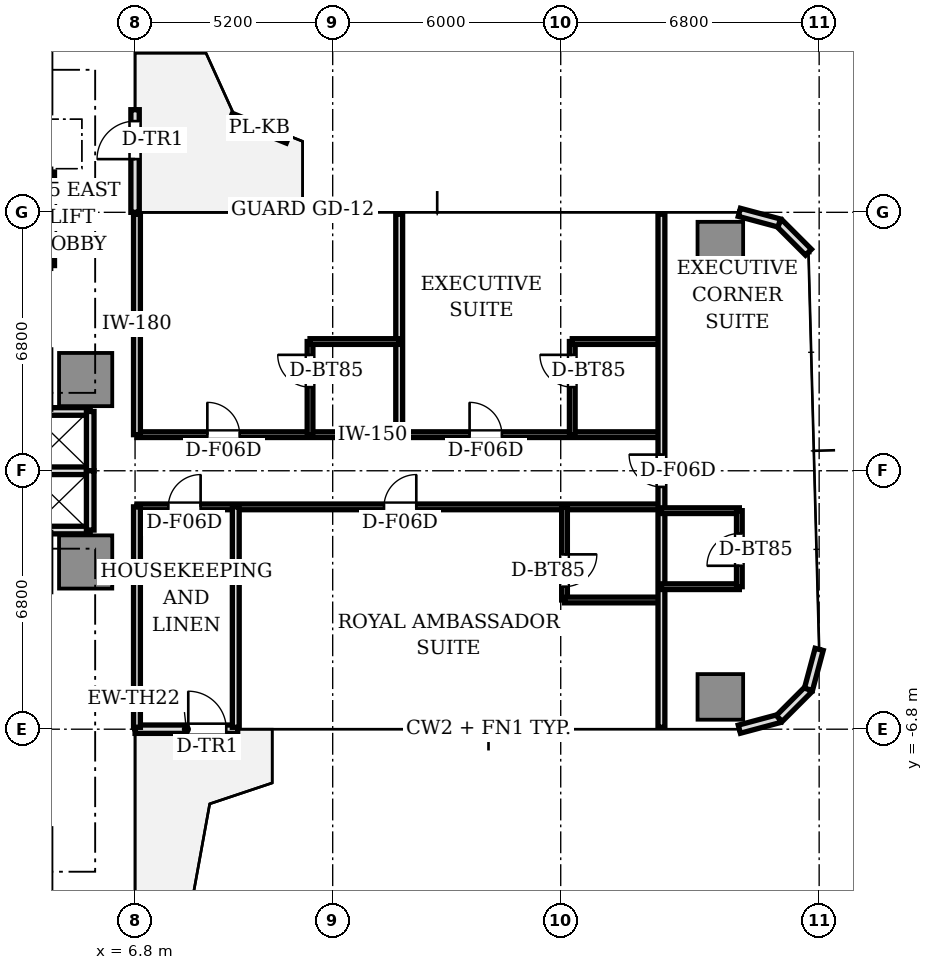
"""IFC4 building model, lengths in metres.
Left out: names, types, materials, properties, quantities, classifications, styles, units other than length and angle.
Written with IfcOpenShell. Run it as: python <this file> out.ifc"""

import sys

from ifc_helpers import new_model, si_unit, direction, frame, frame_2d, origin, origin_2d, place, context, subcontext, project, spatial, rectangle, extrude, source, transform, mapped, element, fill, save


model = new_model("IFC4")
c1 = context("Model", 3, precision=1e-05, world=origin(), true_north=direction((0.0, 1.0)))
c2 = subcontext(c1, "Body", "Model", "MODEL_VIEW")
j1 = project(units=[si_unit("LENGTHUNIT", "METRE"), si_unit("PLANEANGLEUNIT", "RADIAN")], contexts=[c1])
p1 = place(None, origin())
s1 = spatial("IfcSite", under=j1, at=p1, CompositionType="ELEMENT")
p2 = place(p1, origin())
s2 = spatial("IfcBuilding", under=s1, at=p2, CompositionType="ELEMENT")
p3 = place(p2, frame((0.0, 0.0, 57.75)))
s3 = spatial("IfcBuildingStorey", under=s2, at=p3, CompositionType="ELEMENT", Elevation=57.75)
m1 = source(origin(), c2, "Body", "SweptSolid", [
    extrude(rectangle(XDim=1.4, YDim=1.4, at=origin_2d()), origin(), (0.0, 0.0, 1.0), 3.11),
])
for number, where, z_axis, x_axis in (
    (1, (5.5, 2.4, 0.0), (0.0, 0.0, 1.0), (1.0, 0.0, 0.0)),
    (2, (5.5, -2.4, 0.0), (0.0, 0.0, 1.0), (1.0, 0.0, 0.0)),
):
    element("IfcColumn", number, at=place(p3, frame(where, z_axis=z_axis, x_axis=x_axis)), inside=s3, PredefinedType="COLUMN", context=c2, shape_type="MappedRepresentation", body=[
        mapped(m1, transform((0.0, 0.0, 0.0), scale=1.0)),
    ])
m2 = source(origin(), c2, "Body", "SweptSolid", [
    extrude(rectangle(XDim=1.2, YDim=1.2, at=origin_2d()), origin(), (0.0, 0.0, 1.0), 3.11),
])
for number, where, z_axis, x_axis in (
    (3, (22.2, -5.95, 0.0), (0.0, 0.0, 1.0), (1.0, 0.0, 0.0)),
    (4, (22.2, 5.95, 0.0), (0.0, 0.0, 1.0), (1.0, 0.0, 0.0)),
):
    element("IfcColumn", number, at=place(p3, frame(where, z_axis=z_axis, x_axis=x_axis)), inside=s3, PredefinedType="COLUMN", context=c2, shape_type="MappedRepresentation", body=[
        mapped(m2, transform((0.0, 0.0, 0.0), scale=1.0)),
    ])
p4 = place(p3, frame((6.8, -6.8, 0.0), z_axis=(0.0, 0.0, 1.0), x_axis=(1.0, 0.0, 0.0)))
e5 = element("IfcWall", 5, at=p4, inside=s3, PredefinedType="STANDARD", context=c2, shape_type="SweptSolid", body=[
    extrude(rectangle(XDim=2.7, YDim=0.22, at=frame_2d((1.35, 0.0))), origin(), (0.0, 0.0, 1.0), 3.11),
])
p5 = place(p4, frame((1.4, 0.0, 0.0)))
e6 = element("IfcOpeningElement", 6, at=p5, cuts=e5, PredefinedType="OPENING", context=c2, shape_type="SweptSolid", body=[
    extrude(rectangle(XDim=1.0, YDim=2.2, at=frame_2d((0.5, 1.1))), frame((0.0, 0.12, 0.0), z_axis=(0.0, -1.0, 0.0), x_axis=(1.0, 0.0, 0.0)), (0.0, 0.0, 1.0), 0.24),
])
for number, where, z_axis, x_axis in (
    (7, (22.7, -6.8, 0.0), (0.0, 0.0, 1.0), (0.966, 0.259, 0.0)),
    (8, (23.75, -6.519, 0.0), (0.0, 0.0, 1.0), (0.707, 0.707, 0.0)),
    (9, (24.519, -5.75, 0.0), (0.0, 0.0, 1.0), (0.259, 0.966, 0.0)),
    (10, (24.519, 5.75, 0.0), (0.0, 0.0, 1.0), (-0.707, 0.707, 0.0)),
    (11, (23.75, 6.519, 0.0), (0.0, 0.0, 1.0), (-0.966, 0.259, 0.0)),
):
    element("IfcWall", number, at=place(p3, frame(where, z_axis=z_axis, x_axis=x_axis)), inside=s3, PredefinedType="STANDARD", context=c2, shape_type="SweptSolid", body=[
        extrude(rectangle(XDim=1.087, YDim=0.22, at=frame_2d((0.543, 0.0))), origin(), (0.0, 0.0, 1.0), 3.11),
    ])
p6 = place(p3, frame((6.8, 6.8, 0.0), z_axis=(0.0, 0.0, 1.0), x_axis=(0.0, 1.0, 0.0)))
e12 = element("IfcWall", 12, at=p6, inside=s3, PredefinedType="STANDARD", context=c2, shape_type="SweptSolid", body=[
    extrude(rectangle(XDim=2.7, YDim=0.22, at=frame_2d((1.35, 0.0))), origin(), (0.0, 0.0, 1.0), 3.11),
])
p7 = place(p6, frame((1.4, 0.0, 0.0)))
e13 = element("IfcOpeningElement", 13, at=p7, cuts=e12, PredefinedType="OPENING", context=c2, shape_type="SweptSolid", body=[
    extrude(rectangle(XDim=1.0, YDim=2.2, at=frame_2d((0.5, 1.1))), frame((0.0, 0.12, 0.0), z_axis=(0.0, -1.0, 0.0), x_axis=(1.0, 0.0, 0.0)), (0.0, 0.0, 1.0), 0.24),
])
p8 = place(p3, frame((10.815, 8.716, 0.0), z_axis=(0.0, 0.0, 1.0), x_axis=(-0.928592072744, 0.371102091664, 0.0)))
e14 = element("IfcWall", 14, at=p8, inside=s3, PredefinedType="PARAPET", context=c2, shape_type="SweptSolid", body=[
    extrude(rectangle(XDim=1.604, YDim=0.2, at=frame_2d((0.802, 0.0))), origin(), (0.0, 0.0, 1.0), 0.65),
])
for number, where, z_axis, x_axis in (
    (15, (3.98, 1.56, 0.0), (0.0, 0.0, 1.0), (1.0, 0.0, 0.0)),
    (16, (3.98, -1.56, 0.0), (0.0, 0.0, 1.0), (1.0, 0.0, 0.0)),
    (17, (3.98, 0.0, 0.0), (0.0, 0.0, 1.0), (1.0, 0.0, 0.0)),
):
    element("IfcWall", number, at=place(p3, frame(where, z_axis=z_axis, x_axis=x_axis)), inside=s3, PredefinedType="SOLIDWALL", context=c2, shape_type="SweptSolid", body=[
        extrude(rectangle(XDim=1.64, YDim=0.2, at=frame_2d((0.82, 0.0))), origin(), (0.0, 0.0, 1.0), 2.66),
    ])
for number, where, z_axis, x_axis in (
    (18, (5.62, 0.0, 0.0), (0.0, 0.0, 1.0), (0.0, 1.0, 0.0)),
    (19, (5.62, -1.56, 0.0), (0.0, 0.0, 1.0), (0.0, 1.0, 0.0)),
):
    element("IfcWall", number, at=place(p3, frame(where, z_axis=z_axis, x_axis=x_axis)), inside=s3, PredefinedType="SOLIDWALL", context=c2, shape_type="SweptSolid", body=[
        extrude(rectangle(XDim=1.56, YDim=0.2, at=frame_2d((0.78, 0.0))), origin(), (0.0, 0.0, 1.0), 2.66),
    ])
p9 = place(p3, frame((4.58, 5.4, 0.0), z_axis=(0.0, 0.0, 1.0), x_axis=(0.0, 1.0, 0.0)))
e20 = element("IfcWall", 20, at=p9, inside=s3, PredefinedType="SOLIDWALL", context=c2, shape_type="SweptSolid", body=[
    extrude(rectangle(XDim=2.46, YDim=0.2, at=frame_2d((1.23, 0.0))), origin(), (0.0, 0.0, 1.0), 2.66),
])
p10 = place(p9, frame((0.2, 0.0, 0.0)))
e21 = element("IfcOpeningElement", 21, at=p10, cuts=e20, PredefinedType="OPENING", context=c2, shape_type="SweptSolid", body=[
    extrude(rectangle(XDim=0.85, YDim=2.1, at=frame_2d((0.425, 1.05))), frame((0.0, 0.11, 0.0), z_axis=(0.0, -1.0, 0.0), x_axis=(1.0, 0.0, 0.0)), (0.0, 0.0, 1.0), 0.22),
])
p11 = place(p9, frame((1.38, 0.0, 0.0)))
e22 = element("IfcOpeningElement", 22, at=p11, cuts=e20, PredefinedType="OPENING", context=c2, shape_type="SweptSolid", body=[
    extrude(rectangle(XDim=0.85, YDim=2.1, at=frame_2d((0.425, 1.05))), frame((0.0, 0.11, 0.0), z_axis=(0.0, -1.0, 0.0), x_axis=(1.0, 0.0, 0.0)), (0.0, 0.0, 1.0), 0.22),
])
p12 = place(p3, frame((6.85, 0.95, 0.0), z_axis=(0.0, 0.0, 1.0), x_axis=(1.0, 0.0, 0.0)))
e23 = element("IfcWall", 23, at=p12, inside=s3, PredefinedType="PARTITIONING", context=c2, shape_type="SweptSolid", body=[
    extrude(rectangle(XDim=13.8, YDim=0.15, at=frame_2d((6.9, 0.0))), origin(), (0.0, 0.0, 1.0), 2.66),
])
p13 = place(p12, frame((1.852, 0.0, 0.0)))
e24 = element("IfcOpeningElement", 24, at=p13, cuts=e23, PredefinedType="OPENING", context=c2, shape_type="SweptSolid", body=[
    extrude(rectangle(XDim=0.85, YDim=2.1, at=frame_2d((0.425, 1.05))), frame((0.0, 0.085, 0.0), z_axis=(0.0, -1.0, 0.0), x_axis=(1.0, 0.0, 0.0)), (0.0, 0.0, 1.0), 0.17),
])
p14 = place(p12, frame((8.752, 0.0, 0.0)))
e25 = element("IfcOpeningElement", 25, at=p14, cuts=e23, PredefinedType="OPENING", context=c2, shape_type="SweptSolid", body=[
    extrude(rectangle(XDim=0.85, YDim=2.1, at=frame_2d((0.425, 1.05))), frame((0.0, 0.085, 0.0), z_axis=(0.0, -1.0, 0.0), x_axis=(1.0, 0.0, 0.0)), (0.0, 0.0, 1.0), 0.17),
])
p15 = place(p3, frame((6.85, -0.95, 0.0), z_axis=(0.0, 0.0, 1.0), x_axis=(1.0, 0.0, 0.0)))
e26 = element("IfcWall", 26, at=p15, inside=s3, PredefinedType="PARTITIONING", context=c2, shape_type="SweptSolid", body=[
    extrude(rectangle(XDim=13.8, YDim=0.15, at=frame_2d((6.9, 0.0))), origin(), (0.0, 0.0, 1.0), 2.66),
])
p16 = place(p15, frame((0.825, 0.0, 0.0)))
e27 = element("IfcOpeningElement", 27, at=p16, cuts=e26, PredefinedType="OPENING", context=c2, shape_type="SweptSolid", body=[
    extrude(rectangle(XDim=0.85, YDim=2.1, at=frame_2d((0.425, 1.05))), frame((0.0, 0.085, 0.0), z_axis=(0.0, -1.0, 0.0), x_axis=(1.0, 0.0, 0.0)), (0.0, 0.0, 1.0), 0.17),
])
p17 = place(p15, frame((6.5, 0.0, 0.0)))
e28 = element("IfcOpeningElement", 28, at=p17, cuts=e26, PredefinedType="OPENING", context=c2, shape_type="SweptSolid", body=[
    extrude(rectangle(XDim=0.85, YDim=2.1, at=frame_2d((0.425, 1.05))), frame((0.0, 0.085, 0.0), z_axis=(0.0, -1.0, 0.0), x_axis=(1.0, 0.0, 0.0)), (0.0, 0.0, 1.0), 0.17),
])
for number, where, z_axis, x_axis in (
    (29, (6.85, 0.95, 0.0), (0.0, 0.0, 1.0), (0.0, 1.0, 0.0)),
    (30, (6.85, -6.75, 0.0), (0.0, 0.0, 1.0), (0.0, 1.0, 0.0)),
    (31, (13.75, 0.95, 0.0), (0.0, 0.0, 1.0), (0.0, 1.0, 0.0)),
):
    element("IfcWall", number, at=place(p3, frame(where, z_axis=z_axis, x_axis=x_axis)), inside=s3, PredefinedType="PARTITIONING", context=c2, shape_type="SweptSolid", body=[
        extrude(rectangle(XDim=5.8, YDim=0.18, at=frame_2d((2.9, 0.0))), origin(), (0.0, 0.0, 1.0), 2.66),
    ])
p18 = place(p3, frame((11.404, 0.95, 0.0), z_axis=(0.0, 0.0, 1.0), x_axis=(0.0, 1.0, 0.0)))
e32 = element("IfcWall", 32, at=p18, inside=s3, PredefinedType="PARTITIONING", context=c2, shape_type="SweptSolid", body=[
    extrude(rectangle(XDim=2.45, YDim=0.15, at=frame_2d((1.225, 0.0))), origin(), (0.0, 0.0, 1.0), 2.66),
])
p19 = place(p18, frame((1.25, 0.0, 0.0)))
e33 = element("IfcOpeningElement", 33, at=p19, cuts=e32, PredefinedType="OPENING", context=c2, shape_type="SweptSolid", body=[
    extrude(rectangle(XDim=0.85, YDim=2.1, at=frame_2d((0.425, 1.05))), frame((0.0, 0.085, 0.0), z_axis=(0.0, -1.0, 0.0), x_axis=(1.0, 0.0, 0.0)), (0.0, 0.0, 1.0), 0.17),
])
p20 = place(p3, frame((11.404, 3.4, 0.0), z_axis=(0.0, 0.0, 1.0), x_axis=(1.0, 0.0, 0.0)))
e34 = element("IfcWall", 34, at=p20, inside=s3, PredefinedType="PARTITIONING", context=c2, shape_type="SweptSolid", body=[
    extrude(rectangle(XDim=2.346, YDim=0.15, at=frame_2d((1.173, 0.0))), origin(), (0.0, 0.0, 1.0), 2.63),
])
p21 = place(p3, frame((18.304, 0.95, 0.0), z_axis=(0.0, 0.0, 1.0), x_axis=(0.0, 1.0, 0.0)))
e35 = element("IfcWall", 35, at=p21, inside=s3, PredefinedType="PARTITIONING", context=c2, shape_type="SweptSolid", body=[
    extrude(rectangle(XDim=2.45, YDim=0.15, at=frame_2d((1.225, 0.0))), origin(), (0.0, 0.0, 1.0), 2.66),
])
p22 = place(p21, frame((1.25, 0.0, 0.0)))
e36 = element("IfcOpeningElement", 36, at=p22, cuts=e35, PredefinedType="OPENING", context=c2, shape_type="SweptSolid", body=[
    extrude(rectangle(XDim=0.85, YDim=2.1, at=frame_2d((0.425, 1.05))), frame((0.0, 0.085, 0.0), z_axis=(0.0, -1.0, 0.0), x_axis=(1.0, 0.0, 0.0)), (0.0, 0.0, 1.0), 0.17),
])
p23 = place(p3, frame((18.304, 3.4, 0.0), z_axis=(0.0, 0.0, 1.0), x_axis=(1.0, 0.0, 0.0)))
e37 = element("IfcWall", 37, at=p23, inside=s3, PredefinedType="PARTITIONING", context=c2, shape_type="SweptSolid", body=[
    extrude(rectangle(XDim=2.346, YDim=0.15, at=frame_2d((1.173, 0.0))), origin(), (0.0, 0.0, 1.0), 2.63),
])
p24 = place(p3, frame((9.45, -0.95, 0.0), z_axis=(0.0, 0.0, 1.0), x_axis=(0.0, -1.0, 0.0)))
e38 = element("IfcWall", 38, at=p24, inside=s3, PredefinedType="PARTITIONING", context=c2, shape_type="SweptSolid", body=[
    extrude(rectangle(XDim=5.8, YDim=0.18, at=frame_2d((2.9, 0.0))), origin(), (0.0, 0.0, 1.0), 2.66),
])
p25 = place(p3, frame((18.1, -0.95, 0.0), z_axis=(0.0, 0.0, 1.0), x_axis=(0.0, -1.0, 0.0)))
e39 = element("IfcWall", 39, at=p25, inside=s3, PredefinedType="PARTITIONING", context=c2, shape_type="SweptSolid", body=[
    extrude(rectangle(XDim=2.45, YDim=0.15, at=frame_2d((1.225, 0.0))), origin(), (0.0, 0.0, 1.0), 2.66),
])
p26 = place(p25, frame((1.25, 0.0, 0.0)))
e40 = element("IfcOpeningElement", 40, at=p26, cuts=e39, PredefinedType="OPENING", context=c2, shape_type="SweptSolid", body=[
    extrude(rectangle(XDim=0.85, YDim=2.1, at=frame_2d((0.425, 1.05))), frame((0.0, 0.085, 0.0), z_axis=(0.0, -1.0, 0.0), x_axis=(1.0, 0.0, 0.0)), (0.0, 0.0, 1.0), 0.17),
])
p27 = place(p3, frame((18.1, -3.4, 0.0), z_axis=(0.0, 0.0, 1.0), x_axis=(1.0, 0.0, 0.0)))
e41 = element("IfcWall", 41, at=p27, inside=s3, PredefinedType="PARTITIONING", context=c2, shape_type="SweptSolid", body=[
    extrude(rectangle(XDim=2.55, YDim=0.15, at=frame_2d((1.275, 0.0))), origin(), (0.0, 0.0, 1.0), 2.63),
])
p28 = place(p3, frame((20.65, -6.75, 0.0), z_axis=(0.0, 0.0, 1.0), x_axis=(0.0, 1.0, 0.0)))
e42 = element("IfcWall", 42, at=p28, inside=s3, PredefinedType="PARTITIONING", context=c2, shape_type="SweptSolid", body=[
    extrude(rectangle(XDim=13.5, YDim=0.18, at=frame_2d((6.75, 0.0))), origin(), (0.0, 0.0, 1.0), 2.66),
])
p29 = place(p28, frame((6.325, 0.0, 0.0)))
e43 = element("IfcOpeningElement", 43, at=p29, cuts=e42, PredefinedType="OPENING", context=c2, shape_type="SweptSolid", body=[
    extrude(rectangle(XDim=0.85, YDim=2.1, at=frame_2d((0.425, 1.05))), frame((0.0, 0.1, 0.0), z_axis=(0.0, -1.0, 0.0), x_axis=(1.0, 0.0, 0.0)), (0.0, 0.0, 1.0), 0.2),
])
p30 = place(p3, frame((20.65, -1.05, 0.0), z_axis=(0.0, 0.0, 1.0), x_axis=(1.0, 0.0, 0.0)))
e44 = element("IfcWall", 44, at=p30, inside=s3, PredefinedType="PARTITIONING", context=c2, shape_type="SweptSolid", body=[
    extrude(rectangle(XDim=2.05, YDim=0.15, at=frame_2d((1.025, 0.0))), origin(), (0.0, 0.0, 1.0), 2.66),
])
p31 = place(p3, frame((20.65, -3.05, 0.0), z_axis=(0.0, 0.0, 1.0), x_axis=(1.0, 0.0, 0.0)))
e45 = element("IfcWall", 45, at=p31, inside=s3, PredefinedType="PARTITIONING", context=c2, shape_type="SweptSolid", body=[
    extrude(rectangle(XDim=2.05, YDim=0.15, at=frame_2d((1.025, 0.0))), origin(), (0.0, 0.0, 1.0), 2.63),
])
p32 = place(p3, frame((22.7, -3.05, 0.0), z_axis=(0.0, 0.0, 1.0), x_axis=(0.0, 1.0, 0.0)))
e46 = element("IfcWall", 46, at=p32, inside=s3, PredefinedType="PARTITIONING", context=c2, shape_type="SweptSolid", body=[
    extrude(rectangle(XDim=2.0, YDim=0.15, at=frame_2d((1.0, 0.0))), origin(), (0.0, 0.0, 1.0), 2.66),
])
p33 = place(p32, frame((0.55, 0.0, 0.0)))
e47 = element("IfcOpeningElement", 47, at=p33, cuts=e46, PredefinedType="OPENING", context=c2, shape_type="SweptSolid", body=[
    extrude(rectangle(XDim=0.85, YDim=2.1, at=frame_2d((0.425, 1.05))), frame((0.0, 0.085, 0.0), z_axis=(0.0, -1.0, 0.0), x_axis=(1.0, 0.0, 0.0)), (0.0, 0.0, 1.0), 0.17),
])
m3 = source(origin(), c2, "Body", "SweptSolid", [
    extrude(rectangle(XDim=1.0, YDim=0.05, at=origin_2d()), origin(), (0.0, 0.0, 1.0), 2.2),
])
p34 = place(p5, frame((0.5, 0.0, 0.0)))
e48 = element("IfcDoor", 48, at=p34, inside=s3, OperationType="SINGLE_SWING_LEFT", PredefinedType="DOOR", context=c2, shape_type="MappedRepresentation", body=[
    mapped(m3, transform((0.0, 0.0, 0.0), scale=1.0)),
])
fill(e6, e48)
p35 = place(p7, frame((0.5, 0.0, 0.0)))
e49 = element("IfcDoor", 49, at=p35, inside=s3, OperationType="SINGLE_SWING_LEFT", PredefinedType="DOOR", context=c2, shape_type="MappedRepresentation", body=[
    mapped(m3, transform((0.0, 0.0, 0.0), scale=1.0)),
])
fill(e13, e49)
m4 = source(origin(), c2, "Body", "SweptSolid", [
    extrude(rectangle(XDim=0.85, YDim=0.05, at=origin_2d()), origin(), (0.0, 0.0, 1.0), 2.1),
])
p36 = place(p19, frame((0.425, 0.0, 0.0)))
e50 = element("IfcDoor", 50, at=p36, inside=s3, OperationType="SINGLE_SWING_RIGHT", PredefinedType="DOOR", context=c2, shape_type="MappedRepresentation", body=[
    mapped(m4, transform((0.0, 0.0, 0.0), scale=1.0)),
])
fill(e33, e50)
p37 = place(p13, frame((0.425, 0.0, 0.0)))
e51 = element("IfcDoor", 51, at=p37, inside=s3, OperationType="SINGLE_SWING_LEFT", PredefinedType="DOOR", context=c2, shape_type="MappedRepresentation", body=[
    mapped(m4, transform((0.0, 0.0, 0.0), scale=1.0)),
])
fill(e24, e51)
p38 = place(p22, frame((0.425, 0.0, 0.0)))
e52 = element("IfcDoor", 52, at=p38, inside=s3, OperationType="SINGLE_SWING_RIGHT", PredefinedType="DOOR", context=c2, shape_type="MappedRepresentation", body=[
    mapped(m4, transform((0.0, 0.0, 0.0), scale=1.0)),
])
fill(e36, e52)
p39 = place(p14, frame((0.425, 0.0, 0.0)))
e53 = element("IfcDoor", 53, at=p39, inside=s3, OperationType="SINGLE_SWING_LEFT", PredefinedType="DOOR", context=c2, shape_type="MappedRepresentation", body=[
    mapped(m4, transform((0.0, 0.0, 0.0), scale=1.0)),
])
fill(e25, e53)
p40 = place(p16, frame((0.425, 0.0, 0.0)))
e54 = element("IfcDoor", 54, at=p40, inside=s3, OperationType="SINGLE_SWING_RIGHT", PredefinedType="DOOR", context=c2, shape_type="MappedRepresentation", body=[
    mapped(m4, transform((0.0, 0.0, 0.0), scale=1.0)),
])
fill(e27, e54)
p41 = place(p26, frame((0.425, 0.0, 0.0)))
e55 = element("IfcDoor", 55, at=p41, inside=s3, OperationType="SINGLE_SWING_LEFT", PredefinedType="DOOR", context=c2, shape_type="MappedRepresentation", body=[
    mapped(m4, transform((0.0, 0.0, 0.0), scale=1.0)),
])
fill(e40, e55)
p42 = place(p17, frame((0.425, 0.0, 0.0)))
e56 = element("IfcDoor", 56, at=p42, inside=s3, OperationType="SINGLE_SWING_RIGHT", PredefinedType="DOOR", context=c2, shape_type="MappedRepresentation", body=[
    mapped(m4, transform((0.0, 0.0, 0.0), scale=1.0)),
])
fill(e28, e56)
p43 = place(p33, frame((0.425, 0.0, 0.0)))
e57 = element("IfcDoor", 57, at=p43, inside=s3, OperationType="SINGLE_SWING_LEFT", PredefinedType="DOOR", context=c2, shape_type="MappedRepresentation", body=[
    mapped(m4, transform((0.0, 0.0, 0.0), scale=1.0)),
])
fill(e47, e57)
p44 = place(p29, frame((0.425, 0.0, 0.0)))
e58 = element("IfcDoor", 58, at=p44, inside=s3, OperationType="SINGLE_SWING_RIGHT", PredefinedType="DOOR", context=c2, shape_type="MappedRepresentation", body=[
    mapped(m4, transform((0.0, 0.0, 0.0), scale=1.0)),
])
fill(e43, e58)
save(model, sys.argv[1])
